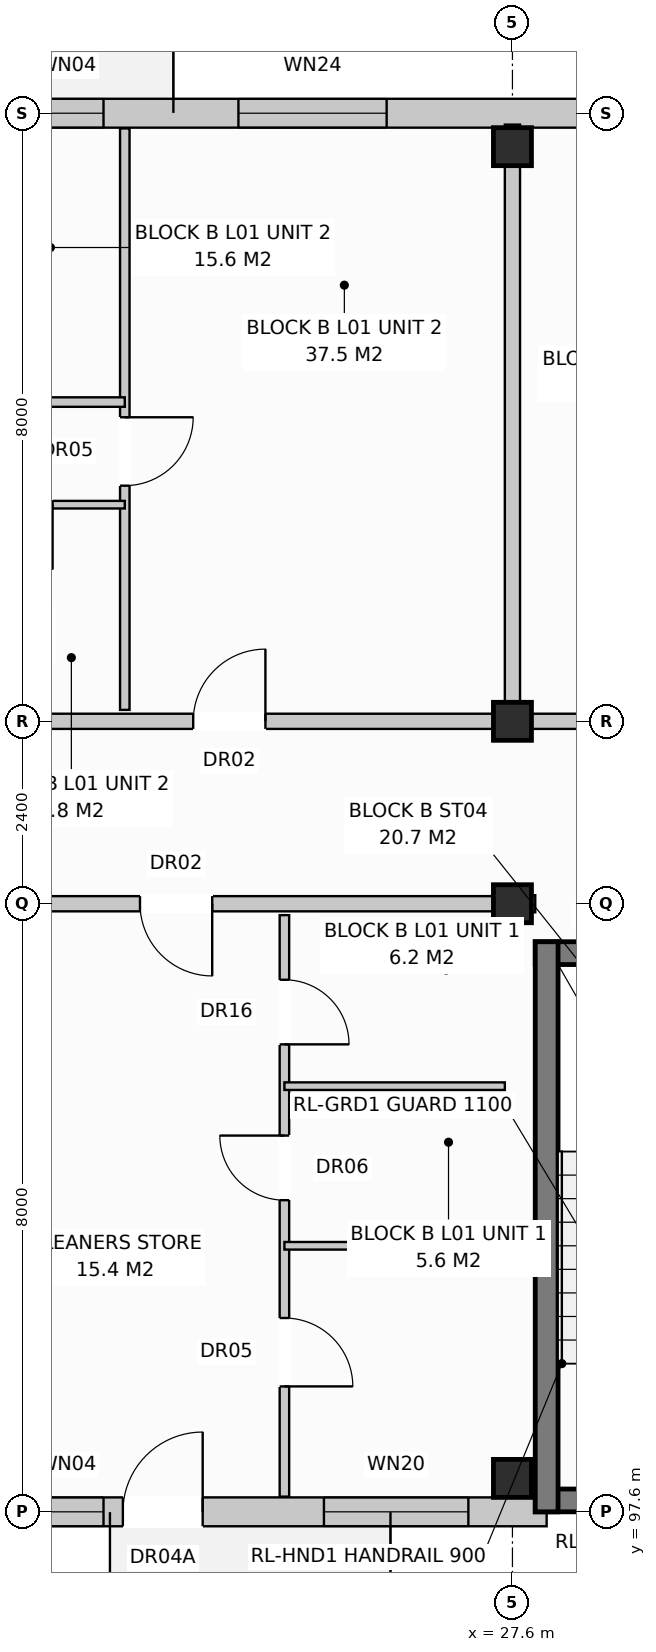
"""IFC4 building model, lengths in metres.
Left out: names, types, materials, properties, quantities, classifications, styles, units other than length and angle.
Written with IfcOpenShell. Run it as: python <this file> out.ifc"""

import sys

from ifc_helpers import new_model, si_unit, direction, frame, frame_2d, origin, origin_with_axes, origin_2d, place, context, subcontext, project, spatial, rectangle, extrude, element, fill, save


model = new_model("IFC4")
c1 = context("Model", 3, precision=1e-05, world=origin(), true_north=direction((0.0, 1.0)))
c2 = subcontext(c1, "Body", "Model", "MODEL_VIEW")
j1 = project(units=[si_unit("LENGTHUNIT", "METRE"), si_unit("PLANEANGLEUNIT", "RADIAN")], contexts=[c1])
p1 = place(None, origin())
s1 = spatial("IfcSite", under=j1, at=p1, CompositionType="ELEMENT")
p2 = place(p1, origin())
s2 = spatial("IfcBuilding", under=s1, at=p2, CompositionType="ELEMENT")
p3 = place(p2, frame((0.0, 0.0, 4.4)))
s3 = spatial("IfcBuildingStorey", under=s2, at=p3, CompositionType="ELEMENT", Elevation=4.4)
for number, where, z_axis, x_axis in (
    (1, (27.6, 98.04, 0.0), (0.0, 0.0, 1.0), (1.0, 0.0, 0.0)),
    (2, (27.6, 105.6, 0.0), (0.0, 0.0, 1.0), (1.0, 0.0, 0.0)),
    (3, (27.6, 108.0, 0.0), (0.0, 0.0, 1.0), (1.0, 0.0, 0.0)),
    (4, (27.6, 115.56, 0.0), (0.0, 0.0, 1.0), (1.0, 0.0, 0.0)),
):
    element("IfcColumn", number, at=place(p3, frame(where, z_axis=z_axis, x_axis=x_axis)), inside=s3, PredefinedType="COLUMN", context=c2, shape_type="SweptSolid", body=[
        extrude(rectangle(XDim=0.5, YDim=0.5, at=origin_2d()), origin(), (0.0, 0.0, 1.0), 3.6),
    ])
p4 = place(p3, frame((10.65, 97.6, 0.0), z_axis=(0.0, 0.0, 1.0), x_axis=(1.0, 0.0, 0.0)))
e5 = element("IfcWall", 5, at=p4, inside=s3, PredefinedType="STANDARD", context=c2, shape_type="SweptSolid", body=[
    extrude(rectangle(XDim=17.4, YDim=0.38, at=frame_2d((8.7, 0.0))), origin(), (0.0, 0.0, 1.0), 3.33),
])
p5 = place(p4, frame((11.825, 0.0, 0.0)))
e6 = element("IfcOpeningElement", 6, at=p5, cuts=e5, PredefinedType="OPENING", context=c2, shape_type="SweptSolid", body=[
    extrude(rectangle(XDim=1.05, YDim=2.12, at=frame_2d((0.525, 1.06))), frame((0.0, 0.202, 0.0), z_axis=(0.0, -1.0, 0.0), x_axis=(1.0, 0.0, 0.0)), (0.0, 0.0, 1.0), 0.404),
])
p6 = place(p4, frame((10.62, 0.0, 0.9)))
e7 = element("IfcOpeningElement", 7, at=p6, cuts=e5, PredefinedType="OPENING", context=c2, shape_type="SweptSolid", body=[
    extrude(rectangle(XDim=0.95, YDim=1.55, at=frame_2d((0.475, 0.775))), frame((0.0, 0.202, 0.0), z_axis=(0.0, -1.0, 0.0), x_axis=(1.0, 0.0, 0.0)), (0.0, 0.0, 1.0), 0.404),
])
p7 = place(p4, frame((14.47, 0.0, 0.8)))
e8 = element("IfcOpeningElement", 8, at=p7, cuts=e5, PredefinedType="OPENING", context=c2, shape_type="SweptSolid", body=[
    extrude(rectangle(XDim=1.9, YDim=1.85, at=frame_2d((0.95, 0.925))), frame((0.0, 0.202, 0.0), z_axis=(0.0, -1.0, 0.0), x_axis=(1.0, 0.0, 0.0)), (0.0, 0.0, 1.0), 0.404),
])
p8 = place(p3, frame((0.18, 116.0, 0.0), z_axis=(0.0, 0.0, 1.0), x_axis=(1.0, 0.0, 0.0)))
e9 = element("IfcWall", 9, at=p8, inside=s3, PredefinedType="STANDARD", context=c2, shape_type="SweptSolid", body=[
    extrude(rectangle(XDim=54.84, YDim=0.38, at=frame_2d((27.42, 0.0))), origin(), (0.0, 0.0, 1.0), 3.33),
])
p9 = place(p8, frame((7.34, 0.0, 0.0)))
e10 = element("IfcOpeningElement", 10, at=p9, cuts=e9, PredefinedType="OPENING", context=c2, shape_type="SweptSolid", body=[
    extrude(rectangle(XDim=1.05, YDim=2.12, at=frame_2d((0.525, 1.06))), frame((0.0, 0.202, 0.0), z_axis=(0.0, -1.0, 0.0), x_axis=(1.0, 0.0, 0.0)), (0.0, 0.0, 1.0), 0.404),
])
p10 = place(p8, frame((18.851, 0.0, 0.0)))
e11 = element("IfcOpeningElement", 11, at=p10, cuts=e9, PredefinedType="OPENING", context=c2, shape_type="SweptSolid", body=[
    extrude(rectangle(XDim=1.05, YDim=2.12, at=frame_2d((0.525, 1.06))), frame((0.0, 0.202, 0.0), z_axis=(0.0, -1.0, 0.0), x_axis=(1.0, 0.0, 0.0)), (0.0, 0.0, 1.0), 0.404),
])
p11 = place(p8, frame((32.651, 0.0, 0.0)))
e12 = element("IfcOpeningElement", 12, at=p11, cuts=e9, PredefinedType="OPENING", context=c2, shape_type="SweptSolid", body=[
    extrude(rectangle(XDim=1.05, YDim=2.12, at=frame_2d((0.525, 1.06))), frame((0.0, 0.202, 0.0), z_axis=(0.0, -1.0, 0.0), x_axis=(1.0, 0.0, 0.0)), (0.0, 0.0, 1.0), 0.404),
])
p12 = place(p8, frame((48.74, 0.0, 0.0)))
e13 = element("IfcOpeningElement", 13, at=p12, cuts=e9, PredefinedType="OPENING", context=c2, shape_type="SweptSolid", body=[
    extrude(rectangle(XDim=1.05, YDim=2.12, at=frame_2d((0.525, 1.06))), frame((0.0, 0.202, 0.0), z_axis=(0.0, -1.0, 0.0), x_axis=(1.0, 0.0, 0.0)), (0.0, 0.0, 1.0), 0.404),
])
p13 = place(p8, frame((1.54, 0.0, 0.8)))
e14 = element("IfcOpeningElement", 14, at=p13, cuts=e9, PredefinedType="OPENING", context=c2, shape_type="SweptSolid", body=[
    extrude(rectangle(XDim=1.9, YDim=1.85, at=frame_2d((0.95, 0.925))), frame((0.0, 0.202, 0.0), z_axis=(0.0, -1.0, 0.0), x_axis=(1.0, 0.0, 0.0)), (0.0, 0.0, 1.0), 0.404),
])
p14 = place(p8, frame((10.415, 0.0, 0.8)))
e15 = element("IfcOpeningElement", 15, at=p14, cuts=e9, PredefinedType="OPENING", context=c2, shape_type="SweptSolid", body=[
    extrude(rectangle(XDim=1.95, YDim=1.65, at=frame_2d((0.975, 0.825))), frame((0.0, 0.202, 0.0), z_axis=(0.0, -1.0, 0.0), x_axis=(1.0, 0.0, 0.0)), (0.0, 0.0, 1.0), 0.404),
])
p15 = place(p8, frame((14.89, 0.0, 0.8)))
e16 = element("IfcOpeningElement", 16, at=p15, cuts=e9, PredefinedType="OPENING", context=c2, shape_type="SweptSolid", body=[
    extrude(rectangle(XDim=1.8, YDim=1.7, at=frame_2d((0.9, 0.85))), frame((0.0, 0.202, 0.0), z_axis=(0.0, -1.0, 0.0), x_axis=(1.0, 0.0, 0.0)), (0.0, 0.0, 1.0), 0.404),
])
p16 = place(p8, frame((21.09, 0.0, 0.9)))
e17 = element("IfcOpeningElement", 17, at=p16, cuts=e9, PredefinedType="OPENING", context=c2, shape_type="SweptSolid", body=[
    extrude(rectangle(XDim=0.95, YDim=1.55, at=frame_2d((0.475, 0.775))), frame((0.0, 0.202, 0.0), z_axis=(0.0, -1.0, 0.0), x_axis=(1.0, 0.0, 0.0)), (0.0, 0.0, 1.0), 0.404),
])
p17 = place(p8, frame((23.815, 0.0, 0.8)))
e18 = element("IfcOpeningElement", 18, at=p17, cuts=e9, PredefinedType="OPENING", context=c2, shape_type="SweptSolid", body=[
    extrude(rectangle(XDim=1.95, YDim=1.65, at=frame_2d((0.975, 0.825))), frame((0.0, 0.202, 0.0), z_axis=(0.0, -1.0, 0.0), x_axis=(1.0, 0.0, 0.0)), (0.0, 0.0, 1.0), 0.404),
])
p18 = place(p8, frame((28.49, 0.0, 0.8)))
e19 = element("IfcOpeningElement", 19, at=p18, cuts=e9, PredefinedType="OPENING", context=c2, shape_type="SweptSolid", body=[
    extrude(rectangle(XDim=1.8, YDim=1.7, at=frame_2d((0.9, 0.85))), frame((0.0, 0.202, 0.0), z_axis=(0.0, -1.0, 0.0), x_axis=(1.0, 0.0, 0.0)), (0.0, 0.0, 1.0), 0.404),
])
p19 = place(p8, frame((35.34, 0.0, 0.8)))
e20 = element("IfcOpeningElement", 20, at=p19, cuts=e9, PredefinedType="OPENING", context=c2, shape_type="SweptSolid", body=[
    extrude(rectangle(XDim=1.9, YDim=1.85, at=frame_2d((0.95, 0.925))), frame((0.0, 0.202, 0.0), z_axis=(0.0, -1.0, 0.0), x_axis=(1.0, 0.0, 0.0)), (0.0, 0.0, 1.0), 0.404),
])
p20 = place(p8, frame((38.455, 0.0, 0.8)))
e21 = element("IfcOpeningElement", 21, at=p20, cuts=e9, PredefinedType="OPENING", context=c2, shape_type="SweptSolid", body=[
    extrude(rectangle(XDim=1.95, YDim=1.65, at=frame_2d((0.975, 0.825))), frame((0.0, 0.202, 0.0), z_axis=(0.0, -1.0, 0.0), x_axis=(1.0, 0.0, 0.0)), (0.0, 0.0, 1.0), 0.404),
])
p21 = place(p8, frame((42.99, 0.0, 0.8)))
e22 = element("IfcOpeningElement", 22, at=p21, cuts=e9, PredefinedType="OPENING", context=c2, shape_type="SweptSolid", body=[
    extrude(rectangle(XDim=1.8, YDim=1.7, at=frame_2d((0.9, 0.85))), frame((0.0, 0.202, 0.0), z_axis=(0.0, -1.0, 0.0), x_axis=(1.0, 0.0, 0.0)), (0.0, 0.0, 1.0), 0.404),
])
p22 = place(p8, frame((51.84, 0.0, 0.8)))
e23 = element("IfcOpeningElement", 23, at=p22, cuts=e9, PredefinedType="OPENING", context=c2, shape_type="SweptSolid", body=[
    extrude(rectangle(XDim=1.9, YDim=1.85, at=frame_2d((0.95, 0.925))), frame((0.0, 0.202, 0.0), z_axis=(0.0, -1.0, 0.0), x_axis=(1.0, 0.0, 0.0)), (0.0, 0.0, 1.0), 0.404),
])
for number, where, z_axis, x_axis in (
    (24, (27.9, 97.75, 0.0), (0.0, 0.0, 1.0), (1.0, 0.0, 0.0)),
    (25, (27.9, 104.95, 0.0), (0.0, 0.0, 1.0), (1.0, 0.0, 0.0)),
):
    element("IfcWall", number, at=place(p3, frame(where, z_axis=z_axis, x_axis=x_axis)), inside=s3, PredefinedType="SHEAR", context=c2, shape_type="SweptSolid", body=[
        extrude(rectangle(XDim=3.6, YDim=0.3, at=frame_2d((1.8, 0.0))), origin(), (0.0, 0.0, 1.0), 3.33),
    ])
p23 = place(p3, frame((28.05, 97.6, 0.0), z_axis=(0.0, 0.0, 1.0), x_axis=(0.0, 1.0, 0.0)))
e26 = element("IfcWall", 26, at=p23, inside=s3, PredefinedType="SHEAR", context=c2, shape_type="SweptSolid", body=[
    extrude(rectangle(XDim=7.5, YDim=0.3, at=frame_2d((3.75, 0.0))), origin(), (0.0, 0.0, 1.0), 3.33),
])
p24 = place(p3, frame((27.6, 105.6, 0.0), z_axis=(0.0, 0.0, 1.0), x_axis=(1.0, 0.0, 0.0)))
e27 = element("IfcWall", 27, at=p24, inside=s3, PredefinedType="PARTITIONING", context=c2, shape_type="SweptSolid", body=[
    extrude(rectangle(XDim=0.3, YDim=0.225, at=frame_2d((0.15, 0.0))), origin(), (0.0, 0.0, 1.0), 3.33),
])
p25 = place(p3, frame((27.6, 108.15, 0.0), z_axis=(0.0, 0.0, 1.0), x_axis=(0.0, 1.0, 0.0)))
e28 = element("IfcWall", 28, at=p25, inside=s3, PredefinedType="PARTITIONING", context=c2, shape_type="SweptSolid", body=[
    extrude(rectangle(XDim=7.7, YDim=0.2, at=frame_2d((3.85, 0.0))), origin(), (0.0, 0.0, 1.0), 3.33),
])
p26 = place(p3, frame((13.8, 108.0, 0.0), z_axis=(0.0, 0.0, 1.0), x_axis=(1.0, 0.0, 0.0)))
e29 = element("IfcWall", 29, at=p26, inside=s3, PredefinedType="PARTITIONING", context=c2, shape_type="SweptSolid", body=[
    extrude(rectangle(XDim=13.8, YDim=0.2, at=frame_2d((6.9, 0.0))), origin(), (0.0, 0.0, 1.0), 2.77),
])
p27 = place(p26, frame((9.6, 0.0, 0.0)))
e30 = element("IfcOpeningElement", 30, at=p27, cuts=e29, PredefinedType="OPENING", context=c2, shape_type="SweptSolid", body=[
    extrude(rectangle(XDim=0.95, YDim=2.15, at=frame_2d((0.475, 1.075))), frame((0.0, 0.112, 0.0), z_axis=(0.0, -1.0, 0.0), x_axis=(1.0, 0.0, 0.0)), (0.0, 0.0, 1.0), 0.224),
])
p28 = place(p3, frame((22.5, 108.15, 0.0), z_axis=(0.0, 0.0, 1.0), x_axis=(0.0, 1.0, 0.0)))
e31 = element("IfcWall", 31, at=p28, inside=s3, PredefinedType="PARTITIONING", context=c2, shape_type="SweptSolid", body=[
    extrude(rectangle(XDim=7.65, YDim=0.125, at=frame_2d((3.825, 0.0))), origin(), (0.0, 0.0, 1.0), 3.33),
])
p29 = place(p28, frame((2.95, 0.0, 0.0)))
e32 = element("IfcOpeningElement", 32, at=p29, cuts=e31, PredefinedType="OPENING", context=c2, shape_type="SweptSolid", body=[
    extrude(rectangle(XDim=0.9, YDim=2.1, at=frame_2d((0.45, 1.05))), frame((0.0, 0.074, 0.0), z_axis=(0.0, -1.0, 0.0), x_axis=(1.0, 0.0, 0.0)), (0.0, 0.0, 1.0), 0.149),
])
p30 = place(p3, frame((13.9, 110.85, 0.0), z_axis=(0.0, 0.0, 1.0), x_axis=(1.0, 0.0, 0.0)))
e33 = element("IfcWall", 33, at=p30, inside=s3, PredefinedType="PARTITIONING", context=c2, shape_type="SweptSolid", body=[
    extrude(rectangle(XDim=8.6, YDim=0.1, at=frame_2d((4.3, 0.0))), origin(), (0.0, 0.0, 1.0), 3.33),
])
p31 = place(p30, frame((1.4, 0.0, 0.0)))
e34 = element("IfcOpeningElement", 34, at=p31, cuts=e33, PredefinedType="OPENING", context=c2, shape_type="SweptSolid", body=[
    extrude(rectangle(XDim=0.85, YDim=2.05, at=frame_2d((0.425, 1.025))), frame((0.0, 0.062, 0.0), z_axis=(0.0, -1.0, 0.0), x_axis=(1.0, 0.0, 0.0)), (0.0, 0.0, 1.0), 0.124),
])
p32 = place(p30, frame((4.65, 0.0, 0.0)))
e35 = element("IfcOpeningElement", 35, at=p32, cuts=e33, PredefinedType="OPENING", context=c2, shape_type="SweptSolid", body=[
    extrude(rectangle(XDim=0.85, YDim=2.05, at=frame_2d((0.425, 1.025))), frame((0.0, 0.062, 0.0), z_axis=(0.0, -1.0, 0.0), x_axis=(1.0, 0.0, 0.0)), (0.0, 0.0, 1.0), 0.124),
])
p33 = place(p30, frame((6.8, 0.0, 0.0)))
e36 = element("IfcOpeningElement", 36, at=p33, cuts=e33, PredefinedType="OPENING", context=c2, shape_type="SweptSolid", body=[
    extrude(rectangle(XDim=0.85, YDim=2.1, at=frame_2d((0.425, 1.05))), frame((0.0, 0.062, 0.0), z_axis=(0.0, -1.0, 0.0), x_axis=(1.0, 0.0, 0.0)), (0.0, 0.0, 1.0), 0.124),
])
p34 = place(p3, frame((18.0, 112.2, 0.0), z_axis=(0.0, 0.0, 1.0), x_axis=(1.0, 0.0, 0.0)))
e37 = element("IfcWall", 37, at=p34, inside=s3, PredefinedType="PARTITIONING", context=c2, shape_type="SweptSolid", body=[
    extrude(rectangle(XDim=4.5, YDim=0.125, at=frame_2d((2.25, 0.0))), origin(), (0.0, 0.0, 1.0), 3.33),
])
p35 = place(p34, frame((1.6, 0.0, 0.0)))
e38 = element("IfcOpeningElement", 38, at=p35, cuts=e37, PredefinedType="OPENING", context=c2, shape_type="SweptSolid", body=[
    extrude(rectangle(XDim=0.9, YDim=2.1, at=frame_2d((0.45, 1.05))), frame((0.0, 0.074, 0.0), z_axis=(0.0, -1.0, 0.0), x_axis=(1.0, 0.0, 0.0)), (0.0, 0.0, 1.0), 0.149),
])
p36 = place(p3, frame((27.6, 108.0, 0.0), z_axis=(0.0, 0.0, 1.0), x_axis=(1.0, 0.0, 0.0)))
e39 = element("IfcWall", 39, at=p36, inside=s3, PredefinedType="PARTITIONING", context=c2, shape_type="SweptSolid", body=[
    extrude(rectangle(XDim=6.9, YDim=0.2, at=frame_2d((3.45, 0.0))), origin(), (0.0, 0.0, 1.0), 2.77),
])
p37 = place(p36, frame((2.0, 0.0, 0.0)))
e40 = element("IfcOpeningElement", 40, at=p37, cuts=e39, PredefinedType="OPENING", context=c2, shape_type="SweptSolid", body=[
    extrude(rectangle(XDim=0.95, YDim=2.15, at=frame_2d((0.475, 1.075))), frame((0.0, 0.112, 0.0), z_axis=(0.0, -1.0, 0.0), x_axis=(1.0, 0.0, 0.0)), (0.0, 0.0, 1.0), 0.224),
])
p38 = place(p3, frame((20.7, 105.6, 0.0), z_axis=(0.0, 0.0, 1.0), x_axis=(1.0, 0.0, 0.0)))
e41 = element("IfcWall", 41, at=p38, inside=s3, PredefinedType="PARTITIONING", context=c2, shape_type="SweptSolid", body=[
    extrude(rectangle(XDim=6.9, YDim=0.2, at=frame_2d((3.45, 0.0))), origin(), (0.0, 0.0, 1.0), 2.77),
])
p39 = place(p38, frame((2.0, 0.0, 0.0)))
e42 = element("IfcOpeningElement", 42, at=p39, cuts=e41, PredefinedType="OPENING", context=c2, shape_type="SweptSolid", body=[
    extrude(rectangle(XDim=0.95, YDim=2.15, at=frame_2d((0.475, 1.075))), frame((0.0, 0.112, 0.0), z_axis=(0.0, -1.0, 0.0), x_axis=(1.0, 0.0, 0.0)), (0.0, 0.0, 1.0), 0.224),
])
p40 = place(p3, frame((24.6, 105.45, 0.0), z_axis=(0.0, 0.0, 1.0), x_axis=(0.0, -1.0, 0.0)))
e43 = element("IfcWall", 43, at=p40, inside=s3, PredefinedType="PARTITIONING", context=c2, shape_type="SweptSolid", body=[
    extrude(rectangle(XDim=7.65, YDim=0.125, at=frame_2d((3.825, 0.0))), origin(), (0.0, 0.0, 1.0), 2.99),
])
p41 = place(p40, frame((0.85, 0.0, 0.0)))
e44 = element("IfcOpeningElement", 44, at=p41, cuts=e43, PredefinedType="OPENING", context=c2, shape_type="SweptSolid", body=[
    extrude(rectangle(XDim=0.85, YDim=2.1, at=frame_2d((0.425, 1.05))), frame((0.0, 0.074, 0.0), z_axis=(0.0, -1.0, 0.0), x_axis=(1.0, 0.0, 0.0)), (0.0, 0.0, 1.0), 0.149),
])
p42 = place(p40, frame((2.9, 0.0, 0.0)))
e45 = element("IfcOpeningElement", 45, at=p42, cuts=e43, PredefinedType="OPENING", context=c2, shape_type="SweptSolid", body=[
    extrude(rectangle(XDim=0.85, YDim=2.05, at=frame_2d((0.425, 1.025))), frame((0.0, 0.074, 0.0), z_axis=(0.0, -1.0, 0.0), x_axis=(1.0, 0.0, 0.0)), (0.0, 0.0, 1.0), 0.149),
])
p43 = place(p40, frame((5.3, 0.0, 0.0)))
e46 = element("IfcOpeningElement", 46, at=p43, cuts=e43, PredefinedType="OPENING", context=c2, shape_type="SweptSolid", body=[
    extrude(rectangle(XDim=0.9, YDim=2.1, at=frame_2d((0.45, 1.05))), frame((0.0, 0.074, 0.0), z_axis=(0.0, -1.0, 0.0), x_axis=(1.0, 0.0, 0.0)), (0.0, 0.0, 1.0), 0.149),
])
for number, where, z_axis, x_axis in (
    (47, (24.6, 103.2, 0.0), (0.0, 0.0, 1.0), (1.0, 0.0, 0.0)),
    (48, (24.6, 101.1, 0.0), (0.0, 0.0, 1.0), (1.0, 0.0, 0.0)),
):
    element("IfcWall", number, at=place(p3, frame(where, z_axis=z_axis, x_axis=x_axis)), inside=s3, PredefinedType="PARTITIONING", context=c2, shape_type="SweptSolid", body=[
        extrude(rectangle(XDim=2.9, YDim=0.1, at=frame_2d((1.45, 0.0))), origin(), (0.0, 0.0, 1.0), 3.33),
    ])
p44 = place(p5, origin_with_axes())
e49 = element("IfcDoor", 49, at=p44, inside=s3, OperationType="SINGLE_SWING_RIGHT", PredefinedType="DOOR", context=c2, shape_type="SweptSolid", body=[
    extrude(rectangle(XDim=1.05, YDim=2.12, at=frame_2d((0.525, 1.06))), frame((0.0, 0.025, 0.0), z_axis=(0.0, -1.0, 0.0), x_axis=(1.0, 0.0, 0.0)), (0.0, 0.0, 1.0), 0.05),
])
fill(e6, e49)
p45 = place(p6, origin_with_axes())
e50 = element("IfcWindow", 50, at=p45, inside=s3, PartitioningType="SINGLE_PANEL", PredefinedType="WINDOW", context=c2, shape_type="SweptSolid", body=[
    extrude(rectangle(XDim=0.95, YDim=1.55, at=frame_2d((0.475, 0.775))), frame((0.0, 0.03, 0.0), z_axis=(0.0, -1.0, 0.0), x_axis=(1.0, 0.0, 0.0)), (0.0, 0.0, 1.0), 0.06),
])
fill(e7, e50)
p46 = place(p7, origin_with_axes())
e51 = element("IfcWindow", 51, at=p46, inside=s3, PartitioningType="SINGLE_PANEL", PredefinedType="WINDOW", context=c2, shape_type="SweptSolid", body=[
    extrude(rectangle(XDim=1.9, YDim=1.85, at=frame_2d((0.95, 0.925))), frame((0.0, 0.03, 0.0), z_axis=(0.0, -1.0, 0.0), x_axis=(1.0, 0.0, 0.0)), (0.0, 0.0, 1.0), 0.06),
])
fill(e8, e51)
p47 = place(p16, origin_with_axes())
e52 = element("IfcWindow", 52, at=p47, inside=s3, PartitioningType="SINGLE_PANEL", PredefinedType="WINDOW", context=c2, shape_type="SweptSolid", body=[
    extrude(rectangle(XDim=0.95, YDim=1.55, at=frame_2d((0.475, 0.775))), frame((0.0, 0.03, 0.0), z_axis=(0.0, -1.0, 0.0), x_axis=(1.0, 0.0, 0.0)), (0.0, 0.0, 1.0), 0.06),
])
fill(e17, e52)
p48 = place(p17, origin_with_axes())
e53 = element("IfcWindow", 53, at=p48, inside=s3, PartitioningType="SINGLE_PANEL", PredefinedType="WINDOW", context=c2, shape_type="SweptSolid", body=[
    extrude(rectangle(XDim=1.95, YDim=1.65, at=frame_2d((0.975, 0.825))), frame((0.0, 0.03, 0.0), z_axis=(0.0, -1.0, 0.0), x_axis=(1.0, 0.0, 0.0)), (0.0, 0.0, 1.0), 0.06),
])
fill(e18, e53)
p49 = place(p27, origin_with_axes())
e54 = element("IfcDoor", 54, at=p49, inside=s3, OperationType="SINGLE_SWING_RIGHT", PredefinedType="DOOR", context=c2, shape_type="SweptSolid", body=[
    extrude(rectangle(XDim=0.95, YDim=2.15, at=frame_2d((0.475, 1.075))), frame((0.0, 0.025, 0.0), z_axis=(0.0, -1.0, 0.0), x_axis=(1.0, 0.0, 0.0)), (0.0, 0.0, 1.0), 0.05),
])
fill(e30, e54)
p50 = place(p29, frame((0.9, 0.0, 0.0), z_axis=(0.0, 0.0, 1.0), x_axis=(-1.0, 0.0, 0.0)))
e55 = element("IfcDoor", 55, at=p50, inside=s3, OperationType="SINGLE_SWING_RIGHT", PredefinedType="DOOR", context=c2, shape_type="SweptSolid", body=[
    extrude(rectangle(XDim=0.9, YDim=2.1, at=frame_2d((0.45, 1.05))), frame((0.0, 0.025, 0.0), z_axis=(0.0, -1.0, 0.0), x_axis=(1.0, 0.0, 0.0)), (0.0, 0.0, 1.0), 0.05),
])
fill(e32, e55)
p51 = place(p39, frame((0.95, 0.0, 0.0), z_axis=(0.0, 0.0, 1.0), x_axis=(-1.0, 0.0, 0.0)))
e56 = element("IfcDoor", 56, at=p51, inside=s3, OperationType="SINGLE_SWING_RIGHT", PredefinedType="DOOR", context=c2, shape_type="SweptSolid", body=[
    extrude(rectangle(XDim=0.95, YDim=2.15, at=frame_2d((0.475, 1.075))), frame((0.0, 0.025, 0.0), z_axis=(0.0, -1.0, 0.0), x_axis=(1.0, 0.0, 0.0)), (0.0, 0.0, 1.0), 0.05),
])
fill(e42, e56)
p52 = place(p41, origin_with_axes())
e57 = element("IfcDoor", 57, at=p52, inside=s3, OperationType="SINGLE_SWING_RIGHT", PredefinedType="DOOR", context=c2, shape_type="SweptSolid", body=[
    extrude(rectangle(XDim=0.85, YDim=2.1, at=frame_2d((0.425, 1.05))), frame((0.0, 0.025, 0.0), z_axis=(0.0, -1.0, 0.0), x_axis=(1.0, 0.0, 0.0)), (0.0, 0.0, 1.0), 0.05),
])
fill(e44, e57)
p53 = place(p42, frame((0.85, 0.0, 0.0), z_axis=(0.0, 0.0, 1.0), x_axis=(-1.0, 0.0, 0.0)))
e58 = element("IfcDoor", 58, at=p53, inside=s3, OperationType="SINGLE_SWING_LEFT", PredefinedType="DOOR", context=c2, shape_type="SweptSolid", body=[
    extrude(rectangle(XDim=0.85, YDim=2.05, at=frame_2d((0.425, 1.025))), frame((0.0, 0.025, 0.0), z_axis=(0.0, -1.0, 0.0), x_axis=(1.0, 0.0, 0.0)), (0.0, 0.0, 1.0), 0.05),
])
fill(e45, e58)
p54 = place(p43, origin_with_axes())
e59 = element("IfcDoor", 59, at=p54, inside=s3, OperationType="SINGLE_SWING_RIGHT", PredefinedType="DOOR", context=c2, shape_type="SweptSolid", body=[
    extrude(rectangle(XDim=0.9, YDim=2.1, at=frame_2d((0.45, 1.05))), frame((0.0, 0.025, 0.0), z_axis=(0.0, -1.0, 0.0), x_axis=(1.0, 0.0, 0.0)), (0.0, 0.0, 1.0), 0.05),
])
fill(e46, e59)
save(model, sys.argv[1])
